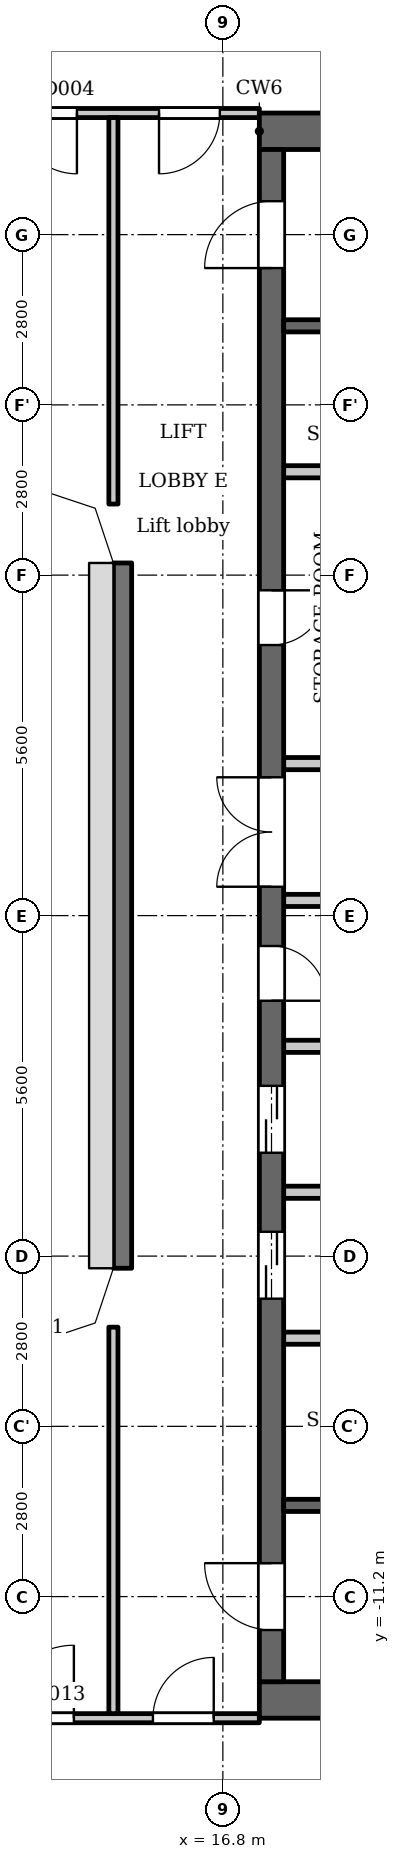
"""IFC4 building model, lengths in metres.
Left out: names, types, materials, properties, quantities, classifications, styles, units other than length and angle.
Written with IfcOpenShell. Run it as: python <this file> out.ifc"""

import sys

from ifc_helpers import new_model, si_unit, direction, frame, frame_2d, origin, place, context, subcontext, project, spatial, polyline, rectangle, outline, extrude, element, fill, save


model = new_model("IFC4")
c1 = context("Model", 3, precision=1e-05, world=origin(), true_north=direction((0.0, 1.0)))
c2 = subcontext(c1, "Body", "Model", "MODEL_VIEW")
j1 = project(units=[si_unit("LENGTHUNIT", "METRE"), si_unit("PLANEANGLEUNIT", "RADIAN")], contexts=[c1])
p1 = place(None, origin())
s1 = spatial("IfcSite", under=j1, at=p1, CompositionType="ELEMENT")
p2 = place(p1, origin())
s2 = spatial("IfcBuilding", under=s1, at=p2, CompositionType="ELEMENT")
p3 = place(p2, frame((0.0, 0.0, 289.1)))
s3 = spatial("IfcBuildingStorey", under=s2, at=p3, CompositionType="ELEMENT", Elevation=289.1)
p4 = place(p3, frame((15.15, 5.8, 0.0), z_axis=(0.0, 0.0, 1.0), x_axis=(0.0, -1.0, 0.0)))
e1 = element("IfcWall", 1, at=p4, inside=s3, PredefinedType="SOLIDWALL", context=c2, shape_type="SweptSolid", body=[
    extrude(rectangle(XDim=11.6, YDim=0.3, at=frame_2d((5.8, 0.0))), origin(), (0.0, 0.0, 1.0), 5.0),
])
for number, where, z_axis, x_axis in (
    (2, (17.4, 12.9, 0.0), (0.0, 0.0, 1.0), (1.0, 0.0, 0.0)),
    (3, (17.4, -12.9, 0.0), (0.0, 0.0, 1.0), (1.0, 0.0, 0.0)),
):
    element("IfcWall", number, at=place(p3, frame(where, z_axis=z_axis, x_axis=x_axis)), inside=s3, PredefinedType="SHEAR", context=c2, shape_type="SweptSolid", body=[
        extrude(rectangle(XDim=7.32, YDim=0.6, at=frame_2d((3.66, 0.0))), origin(), (0.0, 0.0, 1.0), 5.0),
    ])
p5 = place(p3, frame((17.6, -12.6, 0.0), z_axis=(0.0, 0.0, 1.0), x_axis=(0.0, 1.0, 0.0)))
e4 = element("IfcWall", 4, at=p5, inside=s3, PredefinedType="SHEAR", context=c2, shape_type="SweptSolid", body=[
    extrude(rectangle(XDim=25.2, YDim=0.4, at=frame_2d((12.6, 0.0))), origin(), (0.0, 0.0, 1.0), 5.0),
])
p6 = place(p5, frame((6.3, 0.0, 0.0)))
e5 = element("IfcOpeningElement", 5, at=p6, cuts=e4, PredefinedType="OPENING", context=c2, shape_type="SweptSolid", body=[
    extrude(rectangle(XDim=1.1, YDim=2.1, at=frame_2d((0.55, 1.05))), frame((0.0, 0.21, 0.0), z_axis=(0.0, -1.0, 0.0), x_axis=(1.0, 0.0, 0.0)), (0.0, 0.0, 1.0), 0.42),
])
p7 = place(p5, frame((8.7, 0.0, 0.0)))
e6 = element("IfcOpeningElement", 6, at=p7, cuts=e4, PredefinedType="OPENING", context=c2, shape_type="SweptSolid", body=[
    extrude(rectangle(XDim=1.1, YDim=2.1, at=frame_2d((0.55, 1.05))), frame((0.0, 0.21, 0.0), z_axis=(0.0, -1.0, 0.0), x_axis=(1.0, 0.0, 0.0)), (0.0, 0.0, 1.0), 0.42),
])
p8 = place(p5, frame((11.2, 0.0, 0.0)))
e7 = element("IfcOpeningElement", 7, at=p8, cuts=e4, PredefinedType="OPENING", context=c2, shape_type="SweptSolid", body=[
    extrude(rectangle(XDim=0.9, YDim=2.1, at=frame_2d((0.45, 1.05))), frame((0.0, 0.21, 0.0), z_axis=(0.0, -1.0, 0.0), x_axis=(1.0, 0.0, 0.0)), (0.0, 0.0, 1.0), 0.42),
])
p9 = place(p5, frame((17.05, 0.0, 0.0)))
e8 = element("IfcOpeningElement", 8, at=p9, cuts=e4, PredefinedType="OPENING", context=c2, shape_type="SweptSolid", body=[
    extrude(rectangle(XDim=0.9, YDim=2.1, at=frame_2d((0.45, 1.05))), frame((0.0, 0.21, 0.0), z_axis=(0.0, -1.0, 0.0), x_axis=(1.0, 0.0, 0.0)), (0.0, 0.0, 1.0), 0.42),
])
p10 = place(p5, frame((23.25, 0.0, 0.0)))
e9 = element("IfcOpeningElement", 9, at=p10, cuts=e4, PredefinedType="OPENING", context=c2, shape_type="SweptSolid", body=[
    extrude(rectangle(XDim=1.1, YDim=2.1, at=frame_2d((0.55, 1.05))), frame((0.0, 0.21, 0.0), z_axis=(0.0, -1.0, 0.0), x_axis=(1.0, 0.0, 0.0)), (0.0, 0.0, 1.0), 0.42),
])
p11 = place(p5, frame((0.85, 0.0, 0.0)))
e10 = element("IfcOpeningElement", 10, at=p11, cuts=e4, PredefinedType="OPENING", context=c2, shape_type="SweptSolid", body=[
    extrude(rectangle(XDim=1.1, YDim=2.1, at=frame_2d((0.55, 1.05))), frame((0.0, 0.21, 0.0), z_axis=(0.0, -1.0, 0.0), x_axis=(1.0, 0.0, 0.0)), (0.0, 0.0, 1.0), 0.42),
])
p12 = place(p5, frame((13.075, 0.0, 0.0)))
e11 = element("IfcOpeningElement", 11, at=p12, cuts=e4, PredefinedType="OPENING", context=c2, shape_type="SweptSolid", body=[
    extrude(rectangle(XDim=1.8, YDim=2.1, at=frame_2d((0.9, 1.05))), frame((0.0, 0.21, 0.0), z_axis=(0.0, -1.0, 0.0), x_axis=(1.0, 0.0, 0.0)), (0.0, 0.0, 1.0), 0.42),
])
p13 = place(p3, frame((17.8, -9.7, 0.0), z_axis=(0.0, 0.0, 1.0), x_axis=(1.0, 0.0, 0.0)))
e12 = element("IfcWall", 12, at=p13, inside=s3, PredefinedType="SHEAR", context=c2, shape_type="SweptSolid", body=[
    extrude(rectangle(XDim=5.8, YDim=0.2, at=frame_2d((2.9, 0.0))), origin(), (0.0, 0.0, 1.0), 5.0),
])
p14 = place(p13, frame((0.85, 0.0, 0.0)))
e13 = element("IfcOpeningElement", 13, at=p14, cuts=e12, PredefinedType="OPENING", context=c2, shape_type="SweptSolid", body=[
    extrude(rectangle(XDim=1.1, YDim=2.1, at=frame_2d((0.55, 1.05))), frame((0.0, 0.11, 0.0), z_axis=(0.0, -1.0, 0.0), x_axis=(1.0, 0.0, 0.0)), (0.0, 0.0, 1.0), 0.22),
])
p15 = place(p13, frame((3.75, 0.0, 0.0)))
e14 = element("IfcOpeningElement", 14, at=p15, cuts=e12, PredefinedType="OPENING", context=c2, shape_type="SweptSolid", body=[
    extrude(rectangle(XDim=1.1, YDim=2.1, at=frame_2d((0.55, 1.05))), frame((0.0, 0.11, 0.0), z_axis=(0.0, -1.0, 0.0), x_axis=(1.0, 0.0, 0.0)), (0.0, 0.0, 1.0), 0.22),
])
for number, where, z_axis, x_axis in (
    (15, (17.8, -6.95, 0.0), (0.0, 0.0, 1.0), (1.0, 0.0, 0.0)),
    (16, (17.8, -4.55, 0.0), (0.0, 0.0, 1.0), (1.0, 0.0, 0.0)),
    (17, (17.8, -2.15, 0.0), (0.0, 0.0, 1.0), (1.0, 0.0, 0.0)),
):
    element("IfcWall", number, at=place(p3, frame(where, z_axis=z_axis, x_axis=x_axis)), inside=s3, PredefinedType="PARTITIONING", context=c2, shape_type="SweptSolid", body=[
        extrude(rectangle(XDim=2.8, YDim=0.2, at=frame_2d((1.4, 0.0))), origin(), (0.0, 0.0, 1.0), 5.0),
    ])
p16 = place(p3, frame((17.8, 0.25, 0.0), z_axis=(0.0, 0.0, 1.0), x_axis=(1.0, 0.0, 0.0)))
e18 = element("IfcWall", 18, at=p16, inside=s3, PredefinedType="PARTITIONING", context=c2, shape_type="SweptSolid", body=[
    extrude(rectangle(XDim=3.0, YDim=0.2, at=frame_2d((1.5, 0.0))), origin(), (0.0, 0.0, 1.0), 5.0),
])
p17 = place(p3, frame((17.8, 2.5, 0.0), z_axis=(0.0, 0.0, 1.0), x_axis=(1.0, 0.0, 0.0)))
e19 = element("IfcWall", 19, at=p17, inside=s3, PredefinedType="PARTITIONING", context=c2, shape_type="SweptSolid", body=[
    extrude(rectangle(XDim=3.0, YDim=0.2, at=frame_2d((1.5, 0.0))), origin(), (0.0, 0.0, 1.0), 5.0),
])
p18 = place(p17, frame((1.7, 0.0, 0.0)))
e20 = element("IfcOpeningElement", 20, at=p18, cuts=e19, PredefinedType="OPENING", context=c2, shape_type="SweptSolid", body=[
    extrude(rectangle(XDim=0.9, YDim=2.1, at=frame_2d((0.45, 1.05))), frame((0.0, 0.11, 0.0), z_axis=(0.0, -1.0, 0.0), x_axis=(1.0, 0.0, 0.0)), (0.0, 0.0, 1.0), 0.22),
])
p19 = place(p3, frame((17.8, 7.3, 0.0), z_axis=(0.0, 0.0, 1.0), x_axis=(1.0, 0.0, 0.0)))
e21 = element("IfcWall", 21, at=p19, inside=s3, PredefinedType="PARTITIONING", context=c2, shape_type="SweptSolid", body=[
    extrude(rectangle(XDim=2.8, YDim=0.2, at=frame_2d((1.4, 0.0))), origin(), (0.0, 0.0, 1.0), 5.0),
])
p20 = place(p3, frame((17.8, 9.7, 0.0), z_axis=(0.0, 0.0, 1.0), x_axis=(1.0, 0.0, 0.0)))
e22 = element("IfcWall", 22, at=p20, inside=s3, PredefinedType="SHEAR", context=c2, shape_type="SweptSolid", body=[
    extrude(rectangle(XDim=5.8, YDim=0.2, at=frame_2d((2.9, 0.0))), origin(), (0.0, 0.0, 1.0), 5.0),
])
p21 = place(p20, frame((0.85, 0.0, 0.0)))
e23 = element("IfcOpeningElement", 23, at=p21, cuts=e22, PredefinedType="OPENING", context=c2, shape_type="SweptSolid", body=[
    extrude(rectangle(XDim=1.1, YDim=2.1, at=frame_2d((0.55, 1.05))), frame((0.0, 0.11, 0.0), z_axis=(0.0, -1.0, 0.0), x_axis=(1.0, 0.0, 0.0)), (0.0, 0.0, 1.0), 0.22),
])
p22 = place(p20, frame((3.75, 0.0, 0.0)))
e24 = element("IfcOpeningElement", 24, at=p22, cuts=e22, PredefinedType="OPENING", context=c2, shape_type="SweptSolid", body=[
    extrude(rectangle(XDim=1.1, YDim=2.1, at=frame_2d((0.55, 1.05))), frame((0.0, 0.11, 0.0), z_axis=(0.0, -1.0, 0.0), x_axis=(1.0, 0.0, 0.0)), (0.0, 0.0, 1.0), 0.22),
])
p23 = place(p3, frame((-17.4, -13.2, 0.0), z_axis=(0.0, 0.0, 1.0), x_axis=(1.0, 0.0, 0.0)))
e25 = element("IfcWall", 25, at=p23, inside=s3, PredefinedType="PARTITIONING", context=c2, shape_type="SweptSolid", body=[
    extrude(rectangle(XDim=34.8, YDim=0.15, at=frame_2d((17.4, 0.0))), origin(), (0.0, 0.0, 1.0), 5.0),
])
p24 = place(p23, frame((0.65, 0.0, 0.0)))
e26 = element("IfcOpeningElement", 26, at=p24, cuts=e25, PredefinedType="OPENING", context=c2, shape_type="SweptSolid", body=[
    extrude(rectangle(XDim=1.0, YDim=2.1, at=frame_2d((0.5, 1.05))), frame((0.0, 0.085, 0.0), z_axis=(0.0, -1.0, 0.0), x_axis=(1.0, 0.0, 0.0)), (0.0, 0.0, 1.0), 0.17),
])
p25 = place(p23, frame((33.05, 0.0, 0.0)))
e27 = element("IfcOpeningElement", 27, at=p25, cuts=e25, PredefinedType="OPENING", context=c2, shape_type="SweptSolid", body=[
    extrude(rectangle(XDim=1.0, YDim=2.1, at=frame_2d((0.5, 1.05))), frame((0.0, 0.085, 0.0), z_axis=(0.0, -1.0, 0.0), x_axis=(1.0, 0.0, 0.0)), (0.0, 0.0, 1.0), 0.17),
])
p26 = place(p23, frame((6.75, 0.0, 0.0)))
e28 = element("IfcOpeningElement", 28, at=p26, cuts=e25, PredefinedType="OPENING", context=c2, shape_type="SweptSolid", body=[
    extrude(rectangle(XDim=1.0, YDim=2.1, at=frame_2d((0.5, 1.05))), frame((0.0, 0.085, 0.0), z_axis=(0.0, -1.0, 0.0), x_axis=(1.0, 0.0, 0.0)), (0.0, 0.0, 1.0), 0.17),
])
p27 = place(p23, frame((9.0, 0.0, 0.0)))
e29 = element("IfcOpeningElement", 29, at=p27, cuts=e25, PredefinedType="OPENING", context=c2, shape_type="SweptSolid", body=[
    extrude(rectangle(XDim=1.0, YDim=2.1, at=frame_2d((0.5, 1.05))), frame((0.0, 0.085, 0.0), z_axis=(0.0, -1.0, 0.0), x_axis=(1.0, 0.0, 0.0)), (0.0, 0.0, 1.0), 0.17),
])
p28 = place(p23, frame((30.55, 0.0, 0.0)))
e30 = element("IfcOpeningElement", 30, at=p28, cuts=e25, PredefinedType="OPENING", context=c2, shape_type="SweptSolid", body=[
    extrude(rectangle(XDim=1.2, YDim=2.1, at=frame_2d((0.6, 1.05))), frame((0.0, 0.085, 0.0), z_axis=(0.0, -1.0, 0.0), x_axis=(1.0, 0.0, 0.0)), (0.0, 0.0, 1.0), 0.17),
])
p29 = place(p3, frame((-17.4, 13.2, 0.0), z_axis=(0.0, 0.0, 1.0), x_axis=(1.0, 0.0, 0.0)))
e31 = element("IfcWall", 31, at=p29, inside=s3, PredefinedType="PARTITIONING", context=c2, shape_type="SweptSolid", body=[
    extrude(rectangle(XDim=34.8, YDim=0.15, at=frame_2d((17.4, 0.0))), origin(), (0.0, 0.0, 1.0), 5.0),
])
p30 = place(p29, frame((0.75, 0.0, 0.0)))
e32 = element("IfcOpeningElement", 32, at=p30, cuts=e31, PredefinedType="OPENING", context=c2, shape_type="SweptSolid", body=[
    extrude(rectangle(XDim=1.0, YDim=2.1, at=frame_2d((0.5, 1.05))), frame((0.0, 0.085, 0.0), z_axis=(0.0, -1.0, 0.0), x_axis=(1.0, 0.0, 0.0)), (0.0, 0.0, 1.0), 0.17),
])
p31 = place(p29, frame((33.15, 0.0, 0.0)))
e33 = element("IfcOpeningElement", 33, at=p31, cuts=e31, PredefinedType="OPENING", context=c2, shape_type="SweptSolid", body=[
    extrude(rectangle(XDim=1.0, YDim=2.1, at=frame_2d((0.5, 1.05))), frame((0.0, 0.085, 0.0), z_axis=(0.0, -1.0, 0.0), x_axis=(1.0, 0.0, 0.0)), (0.0, 0.0, 1.0), 0.17),
])
p32 = place(p29, frame((3.05, 0.0, 0.0)))
e34 = element("IfcOpeningElement", 34, at=p32, cuts=e31, PredefinedType="OPENING", context=c2, shape_type="SweptSolid", body=[
    extrude(rectangle(XDim=1.2, YDim=2.1, at=frame_2d((0.6, 1.05))), frame((0.0, 0.085, 0.0), z_axis=(0.0, -1.0, 0.0), x_axis=(1.0, 0.0, 0.0)), (0.0, 0.0, 1.0), 0.17),
])
p33 = place(p29, frame((30.8, 0.0, 0.0)))
e35 = element("IfcOpeningElement", 35, at=p33, cuts=e31, PredefinedType="OPENING", context=c2, shape_type="SweptSolid", body=[
    extrude(rectangle(XDim=1.0, YDim=2.1, at=frame_2d((0.5, 1.05))), frame((0.0, 0.085, 0.0), z_axis=(0.0, -1.0, 0.0), x_axis=(1.0, 0.0, 0.0)), (0.0, 0.0, 1.0), 0.17),
])
for number, where, z_axis, x_axis in (
    (36, (15.0, -13.125, 0.0), (0.0, 0.0, 1.0), (0.0, 1.0, 0.0)),
    (37, (15.0, 6.769, 0.0), (0.0, 0.0, 1.0), (0.0, 1.0, 0.0)),
):
    element("IfcWall", number, at=place(p3, frame(where, z_axis=z_axis, x_axis=x_axis)), inside=s3, PredefinedType="PARTITIONING", context=c2, shape_type="SweptSolid", body=[
        extrude(rectangle(XDim=6.356, YDim=0.15, at=frame_2d((3.178, 0.0))), origin(), (0.0, 0.0, 1.0), 5.0),
    ])
p34 = place(p3, origin())
e38 = element("IfcWall", 38, at=p34, inside=s3, PredefinedType="SOLIDWALL", context=c2, shape_type="SweptSolid", body=[
    extrude(outline(polyline([(14.937, 6.937), (13.849, 7.3), (13.8, 7.3), (13.8, 7.0), (14.7, 6.7), (15.0, 5.8), (15.3, 5.8), (15.3, 5.849), (14.937, 6.937)])), origin(), (0.0, 0.0, 1.0), 5.0),
])
e39 = element("IfcWall", 39, at=p34, inside=s3, PredefinedType="SOLIDWALL", context=c2, shape_type="SweptSolid", body=[
    extrude(outline(polyline([(14.937, -6.937), (15.3, -5.849), (15.3, -5.8), (15.0, -5.8), (14.7, -6.7), (13.8, -7.0), (13.8, -7.3), (13.849, -7.3), (14.937, -6.937)])), origin(), (0.0, 0.0, 1.0), 5.0),
])
p35 = place(p6, origin())
e40 = element("IfcDoor", 40, at=p35, inside=s3, OperationType="DOUBLE_DOOR_SLIDING", PredefinedType="DOOR", context=c2, shape_type="SweptSolid", body=[
    extrude(rectangle(XDim=1.1, YDim=2.1, at=frame_2d((0.55, 1.05))), frame((0.0, 0.025, 0.0), z_axis=(0.0, -1.0, 0.0), x_axis=(1.0, 0.0, 0.0)), (0.0, 0.0, 1.0), 0.05),
])
fill(e5, e40)
p36 = place(p7, origin())
e41 = element("IfcDoor", 41, at=p36, inside=s3, OperationType="DOUBLE_DOOR_SLIDING", PredefinedType="DOOR", context=c2, shape_type="SweptSolid", body=[
    extrude(rectangle(XDim=1.1, YDim=2.1, at=frame_2d((0.55, 1.05))), frame((0.0, 0.025, 0.0), z_axis=(0.0, -1.0, 0.0), x_axis=(1.0, 0.0, 0.0)), (0.0, 0.0, 1.0), 0.05),
])
fill(e6, e41)
p37 = place(p8, origin())
e42 = element("IfcDoor", 42, at=p37, inside=s3, OperationType="SINGLE_SWING_LEFT", PredefinedType="DOOR", context=c2, shape_type="SweptSolid", body=[
    extrude(rectangle(XDim=0.9, YDim=2.1, at=frame_2d((0.45, 1.05))), frame((0.0, 0.025, 0.0), z_axis=(0.0, -1.0, 0.0), x_axis=(1.0, 0.0, 0.0)), (0.0, 0.0, 1.0), 0.05),
])
fill(e7, e42)
p38 = place(p9, origin())
e43 = element("IfcDoor", 43, at=p38, inside=s3, OperationType="SINGLE_SWING_RIGHT", PredefinedType="DOOR", context=c2, shape_type="SweptSolid", body=[
    extrude(rectangle(XDim=0.9, YDim=2.1, at=frame_2d((0.45, 1.05))), frame((0.0, 0.025, 0.0), z_axis=(0.0, -1.0, 0.0), x_axis=(1.0, 0.0, 0.0)), (0.0, 0.0, 1.0), 0.05),
])
fill(e8, e43)
p39 = place(p10, origin())
e44 = element("IfcDoor", 44, at=p39, inside=s3, OperationType="SINGLE_SWING_RIGHT", PredefinedType="DOOR", context=c2, shape_type="SweptSolid", body=[
    extrude(rectangle(XDim=1.1, YDim=2.1, at=frame_2d((0.55, 1.05))), frame((0.0, 0.025, 0.0), z_axis=(0.0, -1.0, 0.0), x_axis=(1.0, 0.0, 0.0)), (0.0, 0.0, 1.0), 0.05),
])
fill(e9, e44)
p40 = place(p11, origin())
e45 = element("IfcDoor", 45, at=p40, inside=s3, OperationType="SINGLE_SWING_LEFT", PredefinedType="DOOR", context=c2, shape_type="SweptSolid", body=[
    extrude(rectangle(XDim=1.1, YDim=2.1, at=frame_2d((0.55, 1.05))), frame((0.0, 0.025, 0.0), z_axis=(0.0, -1.0, 0.0), x_axis=(1.0, 0.0, 0.0)), (0.0, 0.0, 1.0), 0.05),
])
fill(e10, e45)
p41 = place(p12, origin())
e46 = element("IfcDoor", 46, at=p41, inside=s3, OperationType="DOUBLE_DOOR_SINGLE_SWING", PredefinedType="DOOR", context=c2, shape_type="SweptSolid", body=[
    extrude(rectangle(XDim=1.8, YDim=2.1, at=frame_2d((0.9, 1.05))), frame((0.0, 0.025, 0.0), z_axis=(0.0, -1.0, 0.0), x_axis=(1.0, 0.0, 0.0)), (0.0, 0.0, 1.0), 0.05),
])
fill(e11, e46)
p42 = place(p31, origin())
e47 = element("IfcDoor", 47, at=p42, inside=s3, OperationType="SINGLE_SWING_LEFT", PredefinedType="DOOR", context=c2, shape_type="SweptSolid", body=[
    extrude(rectangle(XDim=1.0, YDim=2.1, at=frame_2d((0.5, 1.05))), frame((0.0, 0.025, 0.0), z_axis=(0.0, -1.0, 0.0), x_axis=(1.0, 0.0, 0.0)), (0.0, 0.0, 1.0), 0.05),
])
fill(e33, e47)
p43 = place(p33, origin())
e48 = element("IfcDoor", 48, at=p43, inside=s3, OperationType="SINGLE_SWING_RIGHT", PredefinedType="DOOR", context=c2, shape_type="SweptSolid", body=[
    extrude(rectangle(XDim=1.0, YDim=2.1, at=frame_2d((0.5, 1.05))), frame((0.0, 0.025, 0.0), z_axis=(0.0, -1.0, 0.0), x_axis=(1.0, 0.0, 0.0)), (0.0, 0.0, 1.0), 0.05),
])
fill(e35, e48)
p44 = place(p25, origin())
e49 = element("IfcDoor", 49, at=p44, inside=s3, OperationType="SINGLE_SWING_LEFT", PredefinedType="DOOR", context=c2, shape_type="SweptSolid", body=[
    extrude(rectangle(XDim=1.0, YDim=2.1, at=frame_2d((0.5, 1.05))), frame((0.0, 0.025, 0.0), z_axis=(0.0, -1.0, 0.0), x_axis=(1.0, 0.0, 0.0)), (0.0, 0.0, 1.0), 0.05),
])
fill(e27, e49)
p45 = place(p28, origin())
e50 = element("IfcDoor", 50, at=p45, inside=s3, OperationType="SINGLE_SWING_LEFT", PredefinedType="DOOR", context=c2, shape_type="SweptSolid", body=[
    extrude(rectangle(XDim=1.2, YDim=2.1, at=frame_2d((0.6, 1.05))), frame((0.0, 0.025, 0.0), z_axis=(0.0, -1.0, 0.0), x_axis=(1.0, 0.0, 0.0)), (0.0, 0.0, 1.0), 0.05),
])
fill(e30, e50)
save(model, sys.argv[1])
